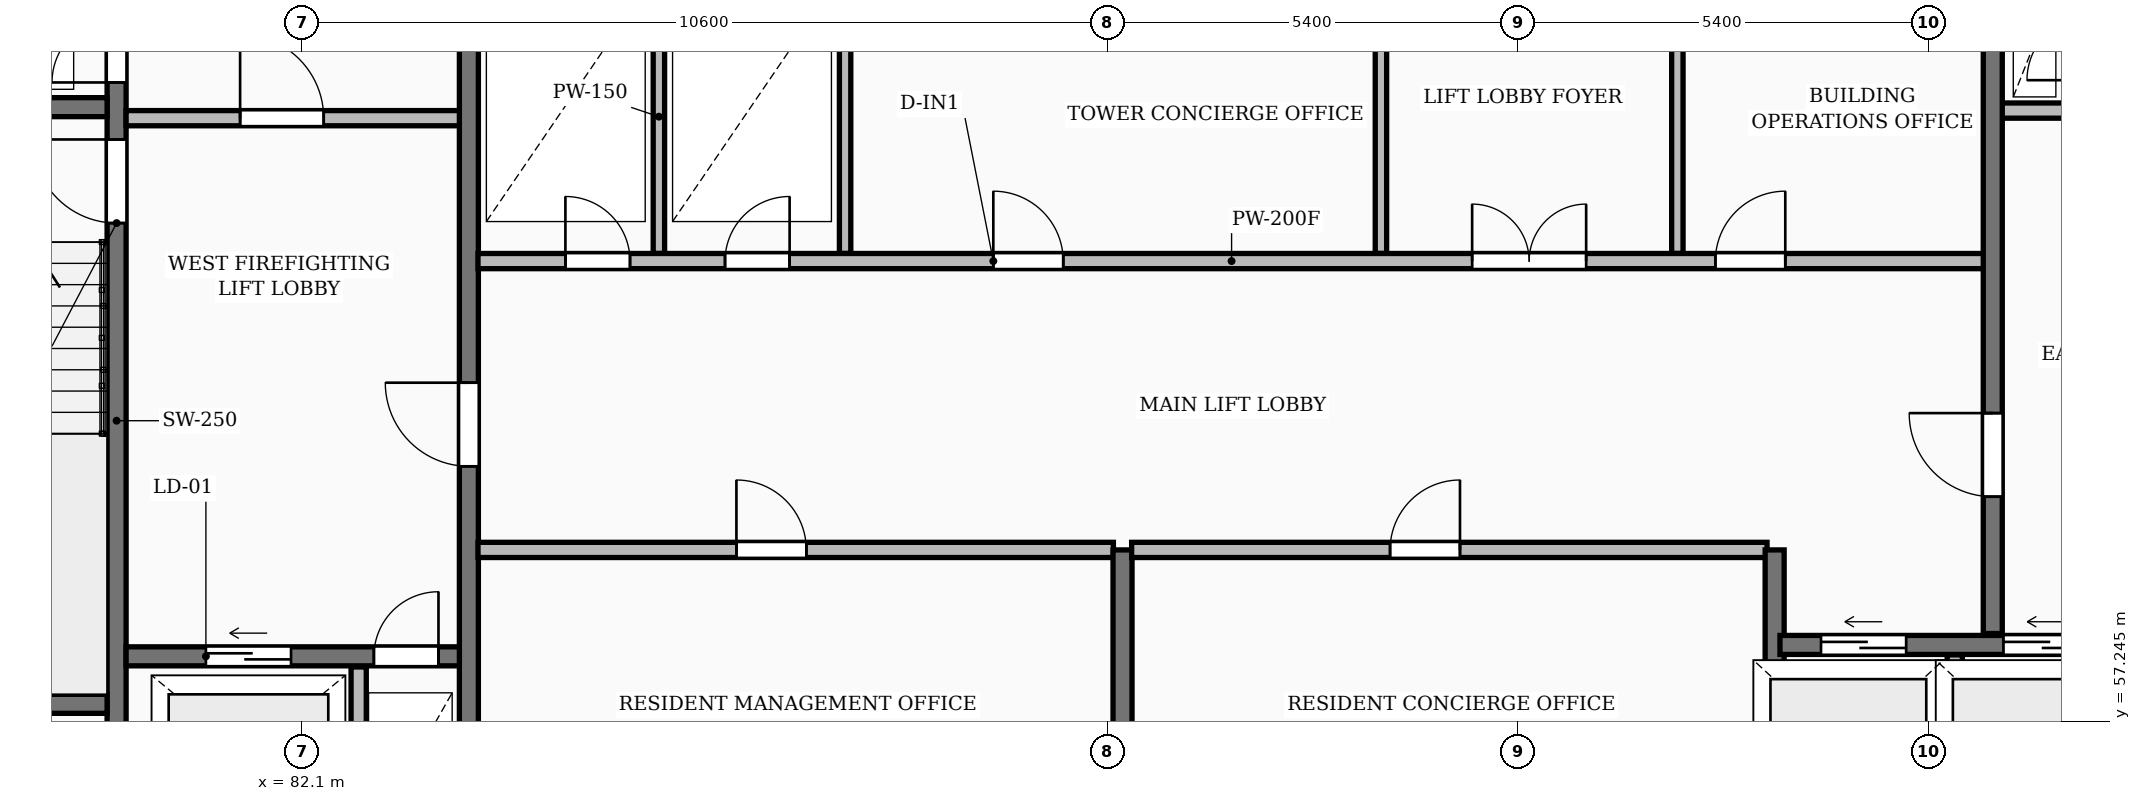
"""IFC4 building model, lengths in metres.
Left out: names, types, materials, properties, quantities, classifications, styles, units other than length and angle.
Written with IfcOpenShell. Run it as: python <this file> out.ifc"""

import sys

from ifc_helpers import new_model, si_unit, direction, frame, frame_2d, origin, place, context, subcontext, project, spatial, rectangle, extrude, element, fill, save


model = new_model("IFC4")
c1 = context("Model", 3, precision=1e-05, world=origin(), true_north=direction((0.0, 1.0)))
c2 = subcontext(c1, "Body", "Model", "MODEL_VIEW")
j1 = project(units=[si_unit("LENGTHUNIT", "METRE"), si_unit("PLANEANGLEUNIT", "RADIAN")], contexts=[c1])
p1 = place(None, origin())
s1 = spatial("IfcSite", under=j1, at=p1, CompositionType="ELEMENT")
p2 = place(p1, origin())
s2 = spatial("IfcBuilding", under=s1, at=p2, CompositionType="ELEMENT")
p3 = place(p2, frame((0.0, 0.0, 228.65)))
s3 = spatial("IfcBuildingStorey", under=s2, at=p3, CompositionType="ELEMENT", Elevation=228.65)
p4 = place(p3, frame((79.665, 55.4, 0.0), z_axis=(0.0, 0.0, 1.0), x_axis=(0.0, 1.0, 0.0)))
e1 = element("IfcWall", 1, at=p4, inside=s3, PredefinedType="SHEAR", context=c2, shape_type="SweptSolid", body=[
    extrude(rectangle(XDim=11.6, YDim=0.25, at=frame_2d((5.8, 0.0))), origin(), (0.0, 0.0, 1.0), 3.45),
])
p5 = place(p4, frame((0.55, 0.0, 0.0)))
e2 = element("IfcOpeningElement", 2, at=p5, cuts=e1, PredefinedType="OPENING", context=c2, shape_type="SweptSolid", body=[
    extrude(rectangle(XDim=0.85, YDim=2.05, at=frame_2d((0.425, 1.025))), frame((0.0, 0.135, 0.0), z_axis=(0.0, -1.0, 0.0), x_axis=(1.0, 0.0, 0.0)), (0.0, 0.0, 1.0), 0.27),
])
p6 = place(p4, frame((8.4, 0.0, 0.0)))
e3 = element("IfcOpeningElement", 3, at=p6, cuts=e1, PredefinedType="OPENING", context=c2, shape_type="SweptSolid", body=[
    extrude(rectangle(XDim=1.1, YDim=2.1, at=frame_2d((0.55, 1.05))), frame((0.0, 0.135, 0.0), z_axis=(0.0, -1.0, 0.0), x_axis=(1.0, 0.0, 0.0)), (0.0, 0.0, 1.0), 0.27),
])
p7 = place(p4, frame((10.25, 0.0, 0.0)))
e4 = element("IfcOpeningElement", 4, at=p7, cuts=e1, PredefinedType="OPENING", context=c2, shape_type="SweptSolid", body=[
    extrude(rectangle(XDim=0.85, YDim=2.05, at=frame_2d((0.425, 1.025))), frame((0.0, 0.135, 0.0), z_axis=(0.0, -1.0, 0.0), x_axis=(1.0, 0.0, 0.0)), (0.0, 0.0, 1.0), 0.27),
])
for number, where, z_axis, x_axis in (
    (5, (76.3, 57.475, 0.0), (0.0, 0.0, 1.0), (1.0, 0.0, 0.0)),
    (6, (76.3, 65.325, 0.0), (0.0, 0.0, 1.0), (1.0, 0.0, 0.0)),
):
    element("IfcWall", number, at=place(p3, frame(where, z_axis=z_axis, x_axis=x_axis)), inside=s3, PredefinedType="SHEAR", context=c2, shape_type="SweptSolid", body=[
        extrude(rectangle(XDim=3.24, YDim=0.25, at=frame_2d((1.62, 0.0))), origin(), (0.0, 0.0, 1.0), 3.45),
    ])
p8 = place(p3, frame((79.79, 58.1, 0.0), z_axis=(0.0, 0.0, 1.0), x_axis=(1.0, 0.0, 0.0)))
e7 = element("IfcWall", 7, at=p8, inside=s3, PredefinedType="SHEAR", context=c2, shape_type="SweptSolid", body=[
    extrude(rectangle(XDim=4.39, YDim=0.25, at=frame_2d((2.195, 0.0))), origin(), (0.0, 0.0, 1.0), 3.45),
])
p9 = place(p8, frame((1.05, 0.0, 0.0)))
e8 = element("IfcOpeningElement", 8, at=p9, cuts=e7, PredefinedType="OPENING", context=c2, shape_type="SweptSolid", body=[
    extrude(rectangle(XDim=1.12, YDim=2.12, at=frame_2d((0.56, 1.06))), frame((0.0, 0.135, 0.0), z_axis=(0.0, -1.0, 0.0), x_axis=(1.0, 0.0, 0.0)), (0.0, 0.0, 1.0), 0.27),
])
p10 = place(p8, frame((3.26, 0.0, 0.0)))
e9 = element("IfcOpeningElement", 9, at=p10, cuts=e7, PredefinedType="OPENING", context=c2, shape_type="SweptSolid", body=[
    extrude(rectangle(XDim=0.85, YDim=2.05, at=frame_2d((0.425, 1.025))), frame((0.0, 0.135, 0.0), z_axis=(0.0, -1.0, 0.0), x_axis=(1.0, 0.0, 0.0)), (0.0, 0.0, 1.0), 0.27),
])
p11 = place(p3, frame((82.85, 55.4, 0.0), z_axis=(0.0, 0.0, 1.0), x_axis=(0.0, 1.0, 0.0)))
e10 = element("IfcWall", 10, at=p11, inside=s3, PredefinedType="PARTITIONING", context=c2, shape_type="SweptSolid", body=[
    extrude(rectangle(XDim=2.56, YDim=0.2, at=frame_2d((1.28, 0.0))), origin(), (0.0, 0.0, 1.0), 3.17),
])
p12 = place(p3, frame((79.79, 65.18, 0.0), z_axis=(0.0, 0.0, 1.0), x_axis=(1.0, 0.0, 0.0)))
e11 = element("IfcWall", 11, at=p12, inside=s3, PredefinedType="PARTITIONING", context=c2, shape_type="SweptSolid", body=[
    extrude(rectangle(XDim=4.39, YDim=0.2, at=frame_2d((2.195, 0.0))), origin(), (0.0, 0.0, 1.0), 3.17),
])
p13 = place(p12, frame((1.5, 0.0, 0.0)))
e12 = element("IfcOpeningElement", 12, at=p13, cuts=e11, PredefinedType="OPENING", context=c2, shape_type="SweptSolid", body=[
    extrude(rectangle(XDim=1.1, YDim=2.1, at=frame_2d((0.55, 1.05))), frame((0.0, 0.11, 0.0), z_axis=(0.0, -1.0, 0.0), x_axis=(1.0, 0.0, 0.0)), (0.0, 0.0, 1.0), 0.22),
])
p14 = place(p3, frame((84.3, 55.4, 0.0), z_axis=(0.0, 0.0, 1.0), x_axis=(0.0, 1.0, 0.0)))
e13 = element("IfcWall", 13, at=p14, inside=s3, PredefinedType="SHEAR", context=c2, shape_type="SweptSolid", body=[
    extrude(rectangle(XDim=11.6, YDim=0.25, at=frame_2d((5.8, 0.0))), origin(), (0.0, 0.0, 1.0), 3.45),
])
p15 = place(p14, frame((5.2, 0.0, 0.0)))
e14 = element("IfcOpeningElement", 14, at=p15, cuts=e13, PredefinedType="OPENING", context=c2, shape_type="SweptSolid", body=[
    extrude(rectangle(XDim=1.1, YDim=2.1, at=frame_2d((0.55, 1.05))), frame((0.0, 0.135, 0.0), z_axis=(0.0, -1.0, 0.0), x_axis=(1.0, 0.0, 0.0)), (0.0, 0.0, 1.0), 0.27),
])
p16 = place(p3, frame((84.42, 59.5, 0.0), z_axis=(0.0, 0.0, 1.0), x_axis=(1.0, 0.0, 0.0)))
e15 = element("IfcWall", 15, at=p16, inside=s3, PredefinedType="PARTITIONING", context=c2, shape_type="SweptSolid", body=[
    extrude(rectangle(XDim=8.36, YDim=0.2, at=frame_2d((4.18, 0.0))), origin(), (0.0, 0.0, 1.0), 3.17),
])
p17 = place(p16, frame((3.4, 0.0, 0.0)))
e16 = element("IfcOpeningElement", 16, at=p17, cuts=e15, PredefinedType="OPENING", context=c2, shape_type="SweptSolid", body=[
    extrude(rectangle(XDim=0.92, YDim=2.08, at=frame_2d((0.46, 1.04))), frame((0.0, 0.11, 0.0), z_axis=(0.0, -1.0, 0.0), x_axis=(1.0, 0.0, 0.0)), (0.0, 0.0, 1.0), 0.22),
])
p18 = place(p3, frame((92.9, 55.4, 0.0), z_axis=(0.0, 0.0, 1.0), x_axis=(0.0, 1.0, 0.0)))
e17 = element("IfcWall", 17, at=p18, inside=s3, PredefinedType="SHEAR", context=c2, shape_type="SweptSolid", body=[
    extrude(rectangle(XDim=4.1, YDim=0.25, at=frame_2d((2.05, 0.0))), origin(), (0.0, 0.0, 1.0), 3.45),
])
p19 = place(p3, frame((93.02, 59.5, 0.0), z_axis=(0.0, 0.0, 1.0), x_axis=(1.0, 0.0, 0.0)))
e18 = element("IfcWall", 18, at=p19, inside=s3, PredefinedType="PARTITIONING", context=c2, shape_type="SweptSolid", body=[
    extrude(rectangle(XDim=8.36, YDim=0.2, at=frame_2d((4.18, 0.0))), origin(), (0.0, 0.0, 1.0), 3.17),
])
p20 = place(p19, frame((3.4, 0.0, 0.0)))
e19 = element("IfcOpeningElement", 19, at=p20, cuts=e18, PredefinedType="OPENING", context=c2, shape_type="SweptSolid", body=[
    extrude(rectangle(XDim=0.92, YDim=2.08, at=frame_2d((0.46, 1.04))), frame((0.0, 0.11, 0.0), z_axis=(0.0, -1.0, 0.0), x_axis=(1.0, 0.0, 0.0)), (0.0, 0.0, 1.0), 0.22),
])
p21 = place(p3, frame((101.48, 55.4, 0.0), z_axis=(0.0, 0.0, 1.0), x_axis=(0.0, 1.0, 0.0)))
e20 = element("IfcWall", 20, at=p21, inside=s3, PredefinedType="SHEAR", context=c2, shape_type="SweptSolid", body=[
    extrude(rectangle(XDim=4.1, YDim=0.25, at=frame_2d((2.05, 0.0))), origin(), (0.0, 0.0, 1.0), 3.45),
])
p22 = place(p3, frame((103.85, 55.4, 0.0), z_axis=(0.0, 0.0, 1.0), x_axis=(0.0, 1.0, 0.0)))
e21 = element("IfcWall", 21, at=p22, inside=s3, PredefinedType="PARTITIONING", context=c2, shape_type="SweptSolid", body=[
    extrude(rectangle(XDim=2.72, YDim=0.2, at=frame_2d((1.36, 0.0))), origin(), (0.0, 0.0, 1.0), 3.17),
])
p23 = place(p3, frame((101.55, 58.25, 0.0), z_axis=(0.0, 0.0, 1.0), x_axis=(1.0, 0.0, 0.0)))
e22 = element("IfcWall", 22, at=p23, inside=s3, PredefinedType="SHEAR", context=c2, shape_type="SweptSolid", body=[
    extrude(rectangle(XDim=4.6, YDim=0.25, at=frame_2d((2.3, 0.0))), origin(), (0.0, 0.0, 1.0), 3.45),
])
p24 = place(p23, frame((0.54, 0.0, 0.0)))
e23 = element("IfcOpeningElement", 23, at=p24, cuts=e22, PredefinedType="OPENING", context=c2, shape_type="SweptSolid", body=[
    extrude(rectangle(XDim=1.12, YDim=2.12, at=frame_2d((0.56, 1.06))), frame((0.0, 0.135, 0.0), z_axis=(0.0, -1.0, 0.0), x_axis=(1.0, 0.0, 0.0)), (0.0, 0.0, 1.0), 0.27),
])
p25 = place(p23, frame((2.94, 0.0, 0.0)))
e24 = element("IfcOpeningElement", 24, at=p25, cuts=e22, PredefinedType="OPENING", context=c2, shape_type="SweptSolid", body=[
    extrude(rectangle(XDim=1.12, YDim=2.12, at=frame_2d((0.56, 1.06))), frame((0.0, 0.135, 0.0), z_axis=(0.0, -1.0, 0.0), x_axis=(1.0, 0.0, 0.0)), (0.0, 0.0, 1.0), 0.27),
])
for number, where, z_axis, x_axis in (
    (25, (86.8, 63.4, 0.0), (0.0, 0.0, 1.0), (0.0, 1.0, 0.0)),
    (26, (89.25, 63.4, 0.0), (0.0, 0.0, 1.0), (0.0, 1.0, 0.0)),
    (27, (96.3, 63.4, 0.0), (0.0, 0.0, 1.0), (0.0, 1.0, 0.0)),
    (28, (100.2, 63.4, 0.0), (0.0, 0.0, 1.0), (0.0, 1.0, 0.0)),
):
    element("IfcWall", number, at=place(p3, frame(where, z_axis=z_axis, x_axis=x_axis)), inside=s3, PredefinedType="PARTITIONING", context=c2, shape_type="SweptSolid", body=[
        extrude(rectangle(XDim=3.6, YDim=0.15, at=frame_2d((1.8, 0.0))), origin(), (0.0, 0.0, 1.0), 3.17),
    ])
p26 = place(p3, frame((84.42, 63.3, 0.0), z_axis=(0.0, 0.0, 1.0), x_axis=(1.0, 0.0, 0.0)))
e29 = element("IfcWall", 29, at=p26, inside=s3, PredefinedType="PARTITIONING", context=c2, shape_type="SweptSolid", body=[
    extrude(rectangle(XDim=19.83, YDim=0.2, at=frame_2d((9.915, 0.0))), origin(), (0.0, 0.0, 1.0), 3.17),
])
p27 = place(p26, frame((1.15, 0.0, 0.0)))
e30 = element("IfcOpeningElement", 30, at=p27, cuts=e29, PredefinedType="OPENING", context=c2, shape_type="SweptSolid", body=[
    extrude(rectangle(XDim=0.85, YDim=2.05, at=frame_2d((0.425, 1.025))), frame((0.0, 0.11, 0.0), z_axis=(0.0, -1.0, 0.0), x_axis=(1.0, 0.0, 0.0)), (0.0, 0.0, 1.0), 0.22),
])
p28 = place(p26, frame((3.25, 0.0, 0.0)))
e31 = element("IfcOpeningElement", 31, at=p28, cuts=e29, PredefinedType="OPENING", context=c2, shape_type="SweptSolid", body=[
    extrude(rectangle(XDim=0.85, YDim=2.05, at=frame_2d((0.425, 1.025))), frame((0.0, 0.11, 0.0), z_axis=(0.0, -1.0, 0.0), x_axis=(1.0, 0.0, 0.0)), (0.0, 0.0, 1.0), 0.22),
])
p29 = place(p26, frame((13.08, 0.0, 0.0)))
e32 = element("IfcOpeningElement", 32, at=p29, cuts=e29, PredefinedType="OPENING", context=c2, shape_type="SweptSolid", body=[
    extrude(rectangle(XDim=1.5, YDim=2.2, at=frame_2d((0.75, 1.1))), frame((0.0, 0.11, 0.0), z_axis=(0.0, -1.0, 0.0), x_axis=(1.0, 0.0, 0.0)), (0.0, 0.0, 1.0), 0.22),
])
p30 = place(p26, frame((6.78, 0.0, 0.0)))
e33 = element("IfcOpeningElement", 33, at=p30, cuts=e29, PredefinedType="OPENING", context=c2, shape_type="SweptSolid", body=[
    extrude(rectangle(XDim=0.92, YDim=2.08, at=frame_2d((0.46, 1.04))), frame((0.0, 0.11, 0.0), z_axis=(0.0, -1.0, 0.0), x_axis=(1.0, 0.0, 0.0)), (0.0, 0.0, 1.0), 0.22),
])
p31 = place(p26, frame((16.28, 0.0, 0.0)))
e34 = element("IfcOpeningElement", 34, at=p31, cuts=e29, PredefinedType="OPENING", context=c2, shape_type="SweptSolid", body=[
    extrude(rectangle(XDim=0.92, YDim=2.08, at=frame_2d((0.46, 1.04))), frame((0.0, 0.11, 0.0), z_axis=(0.0, -1.0, 0.0), x_axis=(1.0, 0.0, 0.0)), (0.0, 0.0, 1.0), 0.22),
])
p32 = place(p3, frame((104.45, 65.28, 0.0), z_axis=(0.0, 0.0, 1.0), x_axis=(1.0, 0.0, 0.0)))
e35 = element("IfcWall", 35, at=p32, inside=s3, PredefinedType="PARTITIONING", context=c2, shape_type="SweptSolid", body=[
    extrude(rectangle(XDim=1.2, YDim=0.2, at=frame_2d((0.6, 0.0))), origin(), (0.0, 0.0, 1.0), 3.17),
])
p33 = place(p3, frame((104.35, 58.4, 0.0), z_axis=(0.0, 0.0, 1.0), x_axis=(0.0, 1.0, 0.0)))
e36 = element("IfcWall", 36, at=p33, inside=s3, PredefinedType="SHEAR", context=c2, shape_type="SweptSolid", body=[
    extrude(rectangle(XDim=8.6, YDim=0.25, at=frame_2d((4.3, 0.0))), origin(), (0.0, 0.0, 1.0), 3.45),
])
p34 = place(p33, frame((1.8, 0.0, 0.0)))
e37 = element("IfcOpeningElement", 37, at=p34, cuts=e36, PredefinedType="OPENING", context=c2, shape_type="SweptSolid", body=[
    extrude(rectangle(XDim=1.1, YDim=2.1, at=frame_2d((0.55, 1.05))), frame((0.0, 0.135, 0.0), z_axis=(0.0, -1.0, 0.0), x_axis=(1.0, 0.0, 0.0)), (0.0, 0.0, 1.0), 0.27),
])
p35 = place(p6, origin())
e38 = element("IfcDoor", 38, at=p35, inside=s3, OperationType="SINGLE_SWING_RIGHT", PredefinedType="DOOR", context=c2, shape_type="SweptSolid", body=[
    extrude(rectangle(XDim=1.1, YDim=2.1, at=frame_2d((0.55, 1.05))), frame((0.0, 0.025, 0.0), z_axis=(0.0, -1.0, 0.0), x_axis=(1.0, 0.0, 0.0)), (0.0, 0.0, 1.0), 0.05),
])
fill(e3, e38)
p36 = place(p7, origin())
e39 = element("IfcDoor", 39, at=p36, inside=s3, OperationType="SINGLE_SWING_LEFT", PredefinedType="DOOR", context=c2, shape_type="SweptSolid", body=[
    extrude(rectangle(XDim=0.85, YDim=2.05, at=frame_2d((0.425, 1.025))), frame((0.0, 0.025, 0.0), z_axis=(0.0, -1.0, 0.0), x_axis=(1.0, 0.0, 0.0)), (0.0, 0.0, 1.0), 0.05),
])
fill(e4, e39)
p37 = place(p9, origin())
e40 = element("IfcDoor", 40, at=p37, inside=s3, OperationType="SLIDING_TO_LEFT", PredefinedType="DOOR", context=c2, shape_type="SweptSolid", body=[
    extrude(rectangle(XDim=1.12, YDim=2.12, at=frame_2d((0.56, 1.06))), frame((0.0, 0.025, 0.0), z_axis=(0.0, -1.0, 0.0), x_axis=(1.0, 0.0, 0.0)), (0.0, 0.0, 1.0), 0.05),
])
fill(e8, e40)
p38 = place(p10, origin())
e41 = element("IfcDoor", 41, at=p38, inside=s3, OperationType="SINGLE_SWING_RIGHT", PredefinedType="DOOR", context=c2, shape_type="SweptSolid", body=[
    extrude(rectangle(XDim=0.85, YDim=2.05, at=frame_2d((0.425, 1.025))), frame((0.0, 0.025, 0.0), z_axis=(0.0, -1.0, 0.0), x_axis=(1.0, 0.0, 0.0)), (0.0, 0.0, 1.0), 0.05),
])
fill(e9, e41)
p39 = place(p13, origin())
e42 = element("IfcDoor", 42, at=p39, inside=s3, OperationType="SINGLE_SWING_LEFT", PredefinedType="DOOR", context=c2, shape_type="SweptSolid", body=[
    extrude(rectangle(XDim=1.1, YDim=2.1, at=frame_2d((0.55, 1.05))), frame((0.0, 0.025, 0.0), z_axis=(0.0, -1.0, 0.0), x_axis=(1.0, 0.0, 0.0)), (0.0, 0.0, 1.0), 0.05),
])
fill(e12, e42)
p40 = place(p15, origin())
e43 = element("IfcDoor", 43, at=p40, inside=s3, OperationType="SINGLE_SWING_RIGHT", PredefinedType="DOOR", context=c2, shape_type="SweptSolid", body=[
    extrude(rectangle(XDim=1.1, YDim=2.1, at=frame_2d((0.55, 1.05))), frame((0.0, 0.025, 0.0), z_axis=(0.0, -1.0, 0.0), x_axis=(1.0, 0.0, 0.0)), (0.0, 0.0, 1.0), 0.05),
])
fill(e14, e43)
p41 = place(p17, origin())
e44 = element("IfcDoor", 44, at=p41, inside=s3, OperationType="SINGLE_SWING_LEFT", PredefinedType="DOOR", context=c2, shape_type="SweptSolid", body=[
    extrude(rectangle(XDim=0.92, YDim=2.08, at=frame_2d((0.46, 1.04))), frame((0.0, 0.025, 0.0), z_axis=(0.0, -1.0, 0.0), x_axis=(1.0, 0.0, 0.0)), (0.0, 0.0, 1.0), 0.05),
])
fill(e16, e44)
p42 = place(p20, origin())
e45 = element("IfcDoor", 45, at=p42, inside=s3, OperationType="SINGLE_SWING_RIGHT", PredefinedType="DOOR", context=c2, shape_type="SweptSolid", body=[
    extrude(rectangle(XDim=0.92, YDim=2.08, at=frame_2d((0.46, 1.04))), frame((0.0, 0.025, 0.0), z_axis=(0.0, -1.0, 0.0), x_axis=(1.0, 0.0, 0.0)), (0.0, 0.0, 1.0), 0.05),
])
fill(e19, e45)
p43 = place(p24, origin())
e46 = element("IfcDoor", 46, at=p43, inside=s3, OperationType="SLIDING_TO_LEFT", PredefinedType="DOOR", context=c2, shape_type="SweptSolid", body=[
    extrude(rectangle(XDim=1.12, YDim=2.12, at=frame_2d((0.56, 1.06))), frame((0.0, 0.025, 0.0), z_axis=(0.0, -1.0, 0.0), x_axis=(1.0, 0.0, 0.0)), (0.0, 0.0, 1.0), 0.05),
])
fill(e23, e46)
p44 = place(p25, origin())
e47 = element("IfcDoor", 47, at=p44, inside=s3, OperationType="SLIDING_TO_LEFT", PredefinedType="DOOR", context=c2, shape_type="SweptSolid", body=[
    extrude(rectangle(XDim=1.12, YDim=2.12, at=frame_2d((0.56, 1.06))), frame((0.0, 0.025, 0.0), z_axis=(0.0, -1.0, 0.0), x_axis=(1.0, 0.0, 0.0)), (0.0, 0.0, 1.0), 0.05),
])
fill(e24, e47)
p45 = place(p27, origin())
e48 = element("IfcDoor", 48, at=p45, inside=s3, OperationType="SINGLE_SWING_LEFT", PredefinedType="DOOR", context=c2, shape_type="SweptSolid", body=[
    extrude(rectangle(XDim=0.85, YDim=2.05, at=frame_2d((0.425, 1.025))), frame((0.0, 0.025, 0.0), z_axis=(0.0, -1.0, 0.0), x_axis=(1.0, 0.0, 0.0)), (0.0, 0.0, 1.0), 0.05),
])
fill(e30, e48)
p46 = place(p28, origin())
e49 = element("IfcDoor", 49, at=p46, inside=s3, OperationType="SINGLE_SWING_RIGHT", PredefinedType="DOOR", context=c2, shape_type="SweptSolid", body=[
    extrude(rectangle(XDim=0.85, YDim=2.05, at=frame_2d((0.425, 1.025))), frame((0.0, 0.025, 0.0), z_axis=(0.0, -1.0, 0.0), x_axis=(1.0, 0.0, 0.0)), (0.0, 0.0, 1.0), 0.05),
])
fill(e31, e49)
p47 = place(p29, origin())
e50 = element("IfcDoor", 50, at=p47, inside=s3, OperationType="DOUBLE_DOOR_SINGLE_SWING", PredefinedType="DOOR", context=c2, shape_type="SweptSolid", body=[
    extrude(rectangle(XDim=1.5, YDim=2.2, at=frame_2d((0.75, 1.1))), frame((0.0, 0.025, 0.0), z_axis=(0.0, -1.0, 0.0), x_axis=(1.0, 0.0, 0.0)), (0.0, 0.0, 1.0), 0.05),
])
fill(e32, e50)
p48 = place(p30, origin())
e51 = element("IfcDoor", 51, at=p48, inside=s3, OperationType="SINGLE_SWING_LEFT", PredefinedType="DOOR", context=c2, shape_type="SweptSolid", body=[
    extrude(rectangle(XDim=0.92, YDim=2.08, at=frame_2d((0.46, 1.04))), frame((0.0, 0.025, 0.0), z_axis=(0.0, -1.0, 0.0), x_axis=(1.0, 0.0, 0.0)), (0.0, 0.0, 1.0), 0.05),
])
fill(e33, e51)
p49 = place(p31, origin())
e52 = element("IfcDoor", 52, at=p49, inside=s3, OperationType="SINGLE_SWING_RIGHT", PredefinedType="DOOR", context=c2, shape_type="SweptSolid", body=[
    extrude(rectangle(XDim=0.92, YDim=2.08, at=frame_2d((0.46, 1.04))), frame((0.0, 0.025, 0.0), z_axis=(0.0, -1.0, 0.0), x_axis=(1.0, 0.0, 0.0)), (0.0, 0.0, 1.0), 0.05),
])
fill(e34, e52)
p50 = place(p34, origin())
e53 = element("IfcDoor", 53, at=p50, inside=s3, OperationType="SINGLE_SWING_RIGHT", PredefinedType="DOOR", context=c2, shape_type="SweptSolid", body=[
    extrude(rectangle(XDim=1.1, YDim=2.1, at=frame_2d((0.55, 1.05))), frame((0.0, 0.025, 0.0), z_axis=(0.0, -1.0, 0.0), x_axis=(1.0, 0.0, 0.0)), (0.0, 0.0, 1.0), 0.05),
])
fill(e37, e53)
save(model, sys.argv[1])
